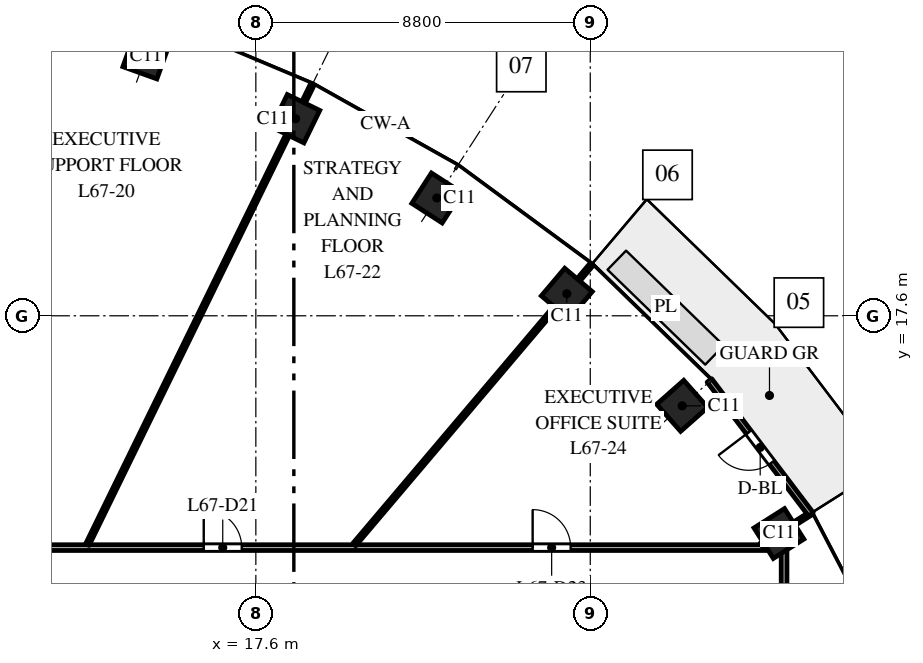
"""IFC4 building model, lengths in metres.
Left out: names, types, materials, properties, quantities, classifications, styles, units other than length and angle.
Written with IfcOpenShell. Run it as: python <this file> out.ifc"""

import sys

from ifc_helpers import new_model, si_unit, direction, frame, frame_2d, origin, origin_2d, place, context, subcontext, project, spatial, rectangle, extrude, element, fill, save


model = new_model("IFC4")
c1 = context("Model", 3, precision=1e-05, world=origin(), true_north=direction((0.0, 1.0)))
c2 = subcontext(c1, "Body", "Model", "MODEL_VIEW")
j1 = project(units=[si_unit("LENGTHUNIT", "METRE"), si_unit("PLANEANGLEUNIT", "RADIAN")], contexts=[c1])
p1 = place(None, origin())
s1 = spatial("IfcSite", under=j1, at=p1, CompositionType="ELEMENT")
p2 = place(p1, origin())
s2 = spatial("IfcBuilding", under=s1, at=p2, CompositionType="ELEMENT")
p3 = place(p2, frame((0.0, 0.0, 311.0)))
s3 = spatial("IfcBuildingStorey", under=s2, at=p3, CompositionType="ELEMENT", Elevation=311.0)
for number, where, z_axis, x_axis in (
    (1, (31.365, 11.871, 0.0), (0.0, 0.0, 1.0), (-0.535, 0.845, 0.0)),
    (2, (28.819, 15.23, 0.0), (0.0, 0.0, 1.0), (-0.663, 0.749, 0.0)),
    (3, (25.783, 18.18, 0.0), (0.0, 0.0, 1.0), (-0.763, 0.646, 0.0)),
    (4, (22.362, 20.7, 0.0), (0.0, 0.0, 1.0), (-0.84, 0.542, 0.0)),
    (5, (18.646, 22.785, 0.0), (0.0, 0.0, 1.0), (-0.898, 0.439, 0.0)),
    (6, (14.709, 24.441, 0.0), (0.0, 0.0, 1.0), (-0.941, 0.338, 0.0)),
):
    element("IfcColumn", number, at=place(p3, frame(where, z_axis=z_axis, x_axis=x_axis)), inside=s3, PredefinedType="COLUMN", context=c2, shape_type="SweptSolid", body=[
        extrude(rectangle(XDim=0.95, YDim=0.95, at=origin_2d()), origin(), (0.0, 0.0, 1.0), 4.0),
    ])
p4 = place(p3, frame((32.208, 12.374, 0.0), z_axis=(0.0, 0.0, 1.0), x_axis=(-0.604045763106, 0.796949632081, 0.0)))
e7 = element("IfcWall", 7, at=p4, inside=s3, PredefinedType="STANDARD", context=c2, shape_type="SweptSolid", body=[
    extrude(rectangle(XDim=4.423, YDim=0.15, at=frame_2d((2.212, 0.0))), origin(), (0.0, 0.0, 1.0), 3.7),
])
p5 = place(p4, frame((1.712, 0.0, 0.0)))
e8 = element("IfcOpeningElement", 8, at=p5, cuts=e7, PredefinedType="OPENING", context=c2, shape_type="SweptSolid", body=[
    extrude(rectangle(XDim=1.0, YDim=2.4, at=frame_2d((0.5, 1.2))), frame((0.0, 0.085, 0.0), z_axis=(0.0, -1.0, 0.0), x_axis=(1.0, 0.0, 0.0)), (0.0, 0.0, 1.0), 0.17),
])
p6 = place(p3, frame((7.129, 11.5, 0.0), z_axis=(0.0, 0.0, 1.0), x_axis=(1.0, 0.0, 0.0)))
e9 = element("IfcWall", 9, at=p6, inside=s3, PredefinedType="PARTITIONING", context=c2, shape_type="SweptSolid", body=[
    extrude(rectangle(XDim=24.371, YDim=0.15, at=frame_2d((12.186, 0.0))), origin(), (0.0, 0.0, 1.0), 2.75),
])
p7 = place(p6, frame((2.609, 0.0, 0.0)))
e10 = element("IfcOpeningElement", 10, at=p7, cuts=e9, PredefinedType="OPENING", context=c2, shape_type="SweptSolid", body=[
    extrude(rectangle(XDim=1.0, YDim=2.1, at=frame_2d((0.5, 1.05))), frame((0.0, 0.085, 0.0), z_axis=(0.0, -1.0, 0.0), x_axis=(1.0, 0.0, 0.0)), (0.0, 0.0, 1.0), 0.17),
])
p8 = place(p6, frame((9.1, 0.0, 0.0)))
e11 = element("IfcOpeningElement", 11, at=p8, cuts=e9, PredefinedType="OPENING", context=c2, shape_type="SweptSolid", body=[
    extrude(rectangle(XDim=1.0, YDim=2.1, at=frame_2d((0.5, 1.05))), frame((0.0, 0.085, 0.0), z_axis=(0.0, -1.0, 0.0), x_axis=(1.0, 0.0, 0.0)), (0.0, 0.0, 1.0), 0.17),
])
p9 = place(p6, frame((17.755, 0.0, 0.0)))
e12 = element("IfcOpeningElement", 12, at=p9, cuts=e9, PredefinedType="OPENING", context=c2, shape_type="SweptSolid", body=[
    extrude(rectangle(XDim=1.0, YDim=2.1, at=frame_2d((0.5, 1.05))), frame((0.0, 0.085, 0.0), z_axis=(0.0, -1.0, 0.0), x_axis=(1.0, 0.0, 0.0)), (0.0, 0.0, 1.0), 0.17),
])
p10 = place(p3, frame((13.167, 11.579, 0.0), z_axis=(0.0, 0.0, 1.0), x_axis=(0.439238726833, 0.898370380661, 0.0)))
e13 = element("IfcWall", 13, at=p10, inside=s3, PredefinedType="PARTITIONING", context=c2, shape_type="SweptSolid", body=[
    extrude(rectangle(XDim=13.475, YDim=0.1, at=frame_2d((6.738, 0.0))), origin(), (0.0, 0.0, 1.0), 3.0),
])
p11 = place(p3, frame((20.189, 11.578, 0.0), z_axis=(0.0, 0.0, 1.0), x_axis=(0.646376264927, 0.763018822926, 0.0)))
e14 = element("IfcWall", 14, at=p11, inside=s3, PredefinedType="PARTITIONING", context=c2, shape_type="SweptSolid", body=[
    extrude(rectangle(XDim=9.655, YDim=0.1, at=frame_2d((4.828, 0.0))), origin(), (0.0, 0.0, 1.0), 3.0),
])
p12 = place(p3, frame((30.897, 11.575, 0.0), z_axis=(0.0, 0.0, 1.0), x_axis=(0.844757626245, 0.535149094086, 0.0)))
e15 = element("IfcWall", 15, at=p12, inside=s3, PredefinedType="PARTITIONING", context=c2, shape_type="SweptSolid", body=[
    extrude(rectangle(XDim=1.557, YDim=0.1, at=frame_2d((0.778, 0.0))), origin(), (0.0, 0.0, 1.0), 3.0),
])
p13 = place(p3, frame((31.5, 8.5, 0.0), z_axis=(0.0, 0.0, 1.0), x_axis=(0.0, 1.0, 0.0)))
e16 = element("IfcWall", 16, at=p13, inside=s3, PredefinedType="PARTITIONING", context=c2, shape_type="SweptSolid", body=[
    extrude(rectangle(XDim=3.0, YDim=0.15, at=frame_2d((1.5, 0.0))), origin(), (0.0, 0.0, 1.0), 3.0),
])
p14 = place(p13, frame((0.9, 0.0, 0.0)))
e17 = element("IfcOpeningElement", 17, at=p14, cuts=e16, PredefinedType="OPENING", context=c2, shape_type="SweptSolid", body=[
    extrude(rectangle(XDim=1.0, YDim=2.1, at=frame_2d((0.5, 1.05))), frame((0.0, 0.085, 0.0), z_axis=(0.0, -1.0, 0.0), x_axis=(1.0, 0.0, 0.0)), (0.0, 0.0, 1.0), 0.17),
])
p15 = place(p5, origin())
e18 = element("IfcDoor", 18, at=p15, inside=s3, OperationType="SINGLE_SWING_RIGHT", PredefinedType="DOOR", context=c2, shape_type="SweptSolid", body=[
    extrude(rectangle(XDim=1.0, YDim=2.4, at=frame_2d((0.5, 1.2))), frame((0.0, 0.025, 0.0), z_axis=(0.0, -1.0, 0.0), x_axis=(1.0, 0.0, 0.0)), (0.0, 0.0, 1.0), 0.05),
])
fill(e8, e18)
p16 = place(p8, origin())
e19 = element("IfcDoor", 19, at=p16, inside=s3, OperationType="SINGLE_SWING_LEFT", PredefinedType="DOOR", context=c2, shape_type="SweptSolid", body=[
    extrude(rectangle(XDim=1.0, YDim=2.1, at=frame_2d((0.5, 1.05))), frame((0.0, 0.025, 0.0), z_axis=(0.0, -1.0, 0.0), x_axis=(1.0, 0.0, 0.0)), (0.0, 0.0, 1.0), 0.05),
])
fill(e11, e19)
p17 = place(p9, origin())
e20 = element("IfcDoor", 20, at=p17, inside=s3, OperationType="SINGLE_SWING_LEFT", PredefinedType="DOOR", context=c2, shape_type="SweptSolid", body=[
    extrude(rectangle(XDim=1.0, YDim=2.1, at=frame_2d((0.5, 1.05))), frame((0.0, 0.025, 0.0), z_axis=(0.0, -1.0, 0.0), x_axis=(1.0, 0.0, 0.0)), (0.0, 0.0, 1.0), 0.05),
])
fill(e12, e20)
save(model, sys.argv[1])
